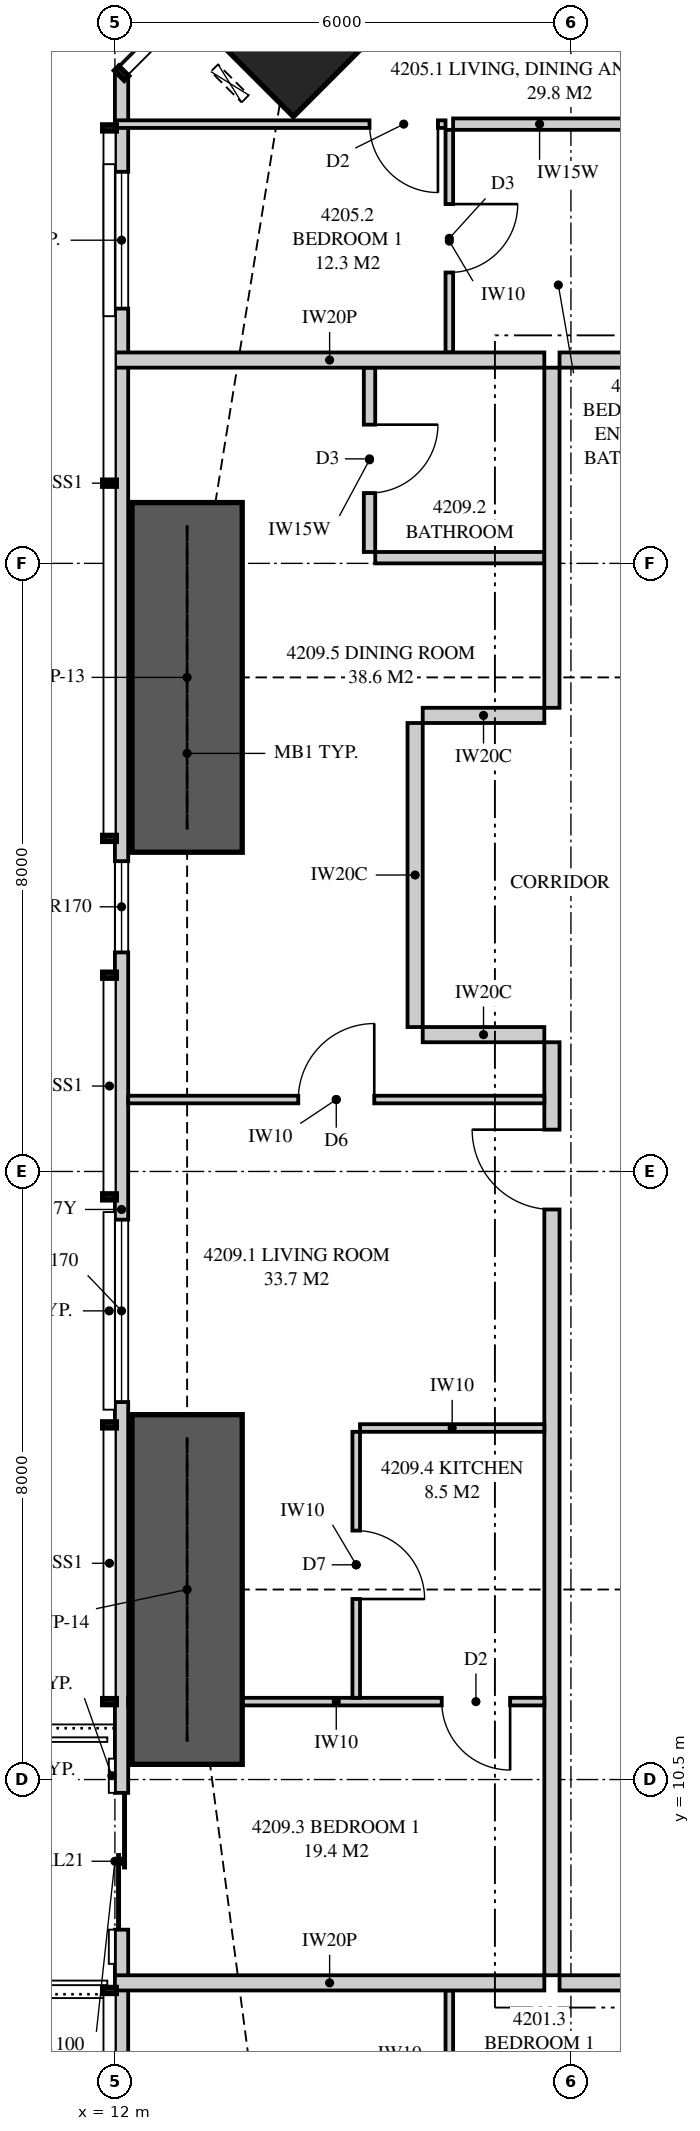
"""IFC4 building model, lengths in metres.
Left out: names, types, materials, properties, quantities, classifications, styles, units other than length and angle.
Written with IfcOpenShell. Run it as: python <this file> out.ifc"""

import sys

from ifc_helpers import new_model, si_unit, direction, frame, frame_2d, origin, origin_2d, place, context, subcontext, project, spatial, polyline, rectangle, hollow_rectangle, outline, extrude, element, fill, save


model = new_model("IFC4")
c1 = context("Model", 3, precision=1e-05, world=origin(), true_north=direction((0.0, 1.0)))
c2 = subcontext(c1, "Body", "Model", "MODEL_VIEW")
j1 = project(units=[si_unit("LENGTHUNIT", "METRE"), si_unit("PLANEANGLEUNIT", "RADIAN")], contexts=[c1])
p1 = place(None, origin())
s1 = spatial("IfcSite", under=j1, at=p1, CompositionType="ELEMENT")
p2 = place(p1, origin())
s2 = spatial("IfcBuilding", under=s1, at=p2, CompositionType="ELEMENT")
p3 = place(p2, frame((0.0, 0.0, 157.7)))
s3 = spatial("IfcBuildingStorey", under=s2, at=p3, CompositionType="ELEMENT", Elevation=157.7)
p4 = place(p3, frame((14.348, 33.652, 0.0), z_axis=(0.0, 0.0, 1.0), x_axis=(0.707106781187, -0.707106781187, 0.0)))
e1 = element("IfcColumn", 1, at=p4, inside=s3, PredefinedType="COLUMN", context=c2, shape_type="SweptSolid", body=[
    extrude(hollow_rectangle(XDim=1.8, YDim=1.8, WallThickness=0.125, at=origin_2d()), origin(), (0.0, 0.0, 1.0), 3.35),
])
p5 = place(p3, frame((12.087, 32.949, 0.0), z_axis=(0.0, 0.0, 1.0), x_axis=(0.0, -1.0, 0.0)))
e2 = element("IfcWall", 2, at=p5, inside=s3, PredefinedType="SOLIDWALL", context=c2, shape_type="SweptSolid", body=[
    extrude(outline(polyline([(0.0, 0.0), (29.897, 0.0), (29.897, 3.11), (20.191, 3.11), (20.191, 2.15), (20.051, 2.15), (20.051, 3.11), (19.949, 3.11), (19.949, 2.15), (7.949, 2.15), (7.949, 3.11), (7.823, 3.11), (7.823, 2.15), (7.73, 2.15), (7.73, 3.11), (0.0, 3.11), (0.0, 0.0)])), frame((0.0, 0.087, 0.0), z_axis=(0.0, -1.0, 0.0), x_axis=(1.0, 0.0, 0.0)), (0.0, 0.0, 1.0), 0.175),
])
p6 = place(p5, frame((1.297, 0.0, 0.4)))
e3 = element("IfcOpeningElement", 3, at=p6, cuts=e2, PredefinedType="OPENING", context=c2, shape_type="SweptSolid", body=[
    extrude(rectangle(XDim=1.8, YDim=1.7, at=frame_2d((0.9, 0.85))), frame((0.0, 0.097, 0.0), z_axis=(0.0, -1.0, 0.0), x_axis=(1.0, 0.0, 0.0)), (0.0, 0.0, 1.0), 0.195),
])
p7 = place(p5, frame((10.367, 0.0, 0.4)))
e4 = element("IfcOpeningElement", 4, at=p7, cuts=e2, PredefinedType="OPENING", context=c2, shape_type="SweptSolid", body=[
    extrude(rectangle(XDim=1.2, YDim=1.7, at=frame_2d((0.6, 0.85))), frame((0.0, 0.097, 0.0), z_axis=(0.0, -1.0, 0.0), x_axis=(1.0, 0.0, 0.0)), (0.0, 0.0, 1.0), 0.195),
])
p8 = place(p5, frame((15.083, 0.0, 0.4)))
e5 = element("IfcOpeningElement", 5, at=p8, cuts=e2, PredefinedType="OPENING", context=c2, shape_type="SweptSolid", body=[
    extrude(rectangle(XDim=2.4, YDim=1.7, at=frame_2d((1.2, 0.85))), frame((0.0, 0.097, 0.0), z_axis=(0.0, -1.0, 0.0), x_axis=(1.0, 0.0, 0.0)), (0.0, 0.0, 1.0), 0.195),
])
p9 = place(p5, frame((22.624, 0.0, 0.0)))
e6 = element("IfcOpeningElement", 6, at=p9, cuts=e2, PredefinedType="OPENING", context=c2, shape_type="SweptSolid", body=[
    extrude(rectangle(XDim=1.8, YDim=2.1, at=frame_2d((0.9, 1.05))), frame((0.0, 0.097, 0.0), z_axis=(0.0, -1.0, 0.0), x_axis=(1.0, 0.0, 0.0)), (0.0, 0.0, 1.0), 0.195),
])
p10 = place(p5, frame((26.301, 0.0, 0.4)))
e7 = element("IfcOpeningElement", 7, at=p10, cuts=e2, PredefinedType="OPENING", context=c2, shape_type="SweptSolid", body=[
    extrude(rectangle(XDim=1.8, YDim=1.7, at=frame_2d((0.9, 0.85))), frame((0.0, 0.097, 0.0), z_axis=(0.0, -1.0, 0.0), x_axis=(1.0, 0.0, 0.0)), (0.0, 0.0, 1.0), 0.195),
])
p11 = place(p3, frame((17.85, 7.825, 0.0), z_axis=(0.0, 0.0, 1.0), x_axis=(1.0, 0.0, 0.0)))
e8 = element("IfcWall", 8, at=p11, inside=s3, PredefinedType="PARTITIONING", context=c2, shape_type="SweptSolid", body=[
    extrude(rectangle(XDim=2.85, YDim=0.2, at=frame_2d((1.425, 0.0))), origin(), (0.0, 0.0, 1.0), 3.11),
])
p12 = place(p11, frame((1.2, 0.0, 0.0)))
e9 = element("IfcOpeningElement", 9, at=p12, cuts=e8, PredefinedType="OPENING", context=c2, shape_type="SweptSolid", body=[
    extrude(rectangle(XDim=1.05, YDim=2.2, at=frame_2d((0.525, 1.1))), frame((0.0, 0.11, 0.0), z_axis=(0.0, -1.0, 0.0), x_axis=(1.0, 0.0, 0.0)), (0.0, 0.0, 1.0), 0.22),
])
p13 = place(p3, frame((16.4, 3.796, 0.0), z_axis=(0.0, 0.0, 1.0), x_axis=(0.0, 1.0, 0.0)))
e10 = element("IfcWall", 10, at=p13, inside=s3, PredefinedType="PARTITIONING", context=c2, shape_type="SweptSolid", body=[
    extrude(rectangle(XDim=3.929, YDim=0.1, at=frame_2d((1.964, 0.0))), origin(), (0.0, 0.0, 1.0), 3.11),
])
p14 = place(p13, frame((1.477, 0.0, 0.0)))
e11 = element("IfcOpeningElement", 11, at=p14, cuts=e10, PredefinedType="OPENING", context=c2, shape_type="SweptSolid", body=[
    extrude(rectangle(XDim=0.9, YDim=2.1, at=frame_2d((0.45, 1.05))), frame((0.0, 0.06, 0.0), z_axis=(0.0, -1.0, 0.0), x_axis=(1.0, 0.0, 0.0)), (0.0, 0.0, 1.0), 0.12),
])
p15 = place(p3, frame((12.0, 7.825, 0.0), z_axis=(0.0, 0.0, 1.0), x_axis=(1.0, 0.0, 0.0)))
e12 = element("IfcWall", 12, at=p15, inside=s3, PredefinedType="PARTITIONING", context=c2, shape_type="SweptSolid", body=[
    extrude(outline(polyline([(0.0, 0.0), (5.65, 0.0), (5.65, 3.11), (2.547, 3.11), (2.547, 2.15), (0.712, 2.15), (0.712, 3.11), (0.0, 3.11), (0.0, 0.0)])), frame((0.0, 0.1, 0.0), z_axis=(0.0, -1.0, 0.0), x_axis=(1.0, 0.0, 0.0)), (0.0, 0.0, 1.0), 0.2),
])
p16 = place(p3, frame((17.85, 29.175, 0.0), z_axis=(0.0, 0.0, 1.0), x_axis=(1.0, 0.0, 0.0)))
e13 = element("IfcWall", 13, at=p16, inside=s3, PredefinedType="PARTITIONING", context=c2, shape_type="SweptSolid", body=[
    extrude(rectangle(XDim=2.65, YDim=0.2, at=frame_2d((1.325, 0.0))), origin(), (0.0, 0.0, 1.0), 3.11),
])
p17 = place(p16, frame((1.2, 0.0, 0.0)))
e14 = element("IfcOpeningElement", 14, at=p17, cuts=e13, PredefinedType="OPENING", context=c2, shape_type="SweptSolid", body=[
    extrude(rectangle(XDim=1.05, YDim=2.2, at=frame_2d((0.525, 1.1))), frame((0.0, 0.11, 0.0), z_axis=(0.0, -1.0, 0.0), x_axis=(1.0, 0.0, 0.0)), (0.0, 0.0, 1.0), 0.22),
])
p18 = place(p3, frame((16.4, 32.204, 0.0), z_axis=(0.0, 0.0, 1.0), x_axis=(0.0, -1.0, 0.0)))
e15 = element("IfcWall", 15, at=p18, inside=s3, PredefinedType="PARTITIONING", context=c2, shape_type="SweptSolid", body=[
    extrude(rectangle(XDim=2.929, YDim=0.1, at=frame_2d((1.464, 0.0))), origin(), (0.0, 0.0, 1.0), 3.11),
])
p19 = place(p18, frame((0.977, 0.0, 0.0)))
e16 = element("IfcOpeningElement", 16, at=p19, cuts=e15, PredefinedType="OPENING", context=c2, shape_type="SweptSolid", body=[
    extrude(rectangle(XDim=0.9, YDim=2.1, at=frame_2d((0.45, 1.05))), frame((0.0, 0.06, 0.0), z_axis=(0.0, -1.0, 0.0), x_axis=(1.0, 0.0, 0.0)), (0.0, 0.0, 1.0), 0.12),
])
p20 = place(p3, frame((16.35, 32.279, 0.0), z_axis=(0.0, 0.0, 1.0), x_axis=(-1.0, 0.0, 0.0)))
e17 = element("IfcWall", 17, at=p20, inside=s3, PredefinedType="PARTITIONING", context=c2, shape_type="SweptSolid", body=[
    extrude(outline(polyline([(0.0, 0.0), (4.35, 0.0), (4.35, 3.11), (3.094, 3.11), (3.094, 2.15), (1.352, 2.15), (1.352, 3.11), (0.0, 3.11), (0.0, 0.0)])), frame((0.0, 0.05, 0.0), z_axis=(0.0, -1.0, 0.0), x_axis=(1.0, 0.0, 0.0)), (0.0, 0.0, 1.0), 0.1),
])
p21 = place(p20, frame((0.1, 0.0, 0.0)))
e18 = element("IfcOpeningElement", 18, at=p21, cuts=e17, PredefinedType="OPENING", context=c2, shape_type="SweptSolid", body=[
    extrude(rectangle(XDim=0.9, YDim=2.1, at=frame_2d((0.45, 1.05))), frame((0.0, 0.06, 0.0), z_axis=(0.0, -1.0, 0.0), x_axis=(1.0, 0.0, 0.0)), (0.0, 0.0, 1.0), 0.12),
])
p22 = place(p3, frame((18.725, 32.279, 0.0), z_axis=(0.0, 0.0, 1.0), x_axis=(-1.0, 0.0, 0.0)))
e19 = element("IfcWall", 19, at=p22, inside=s3, PredefinedType="PLUMBINGWALL", context=c2, shape_type="SweptSolid", body=[
    extrude(rectangle(XDim=2.275, YDim=0.15, at=frame_2d((1.138, 0.0))), origin(), (0.0, 0.0, 1.0), 3.11),
])
p23 = place(p3, frame((12.0, 29.175, 0.0), z_axis=(0.0, 0.0, 1.0), x_axis=(1.0, 0.0, 0.0)))
e20 = element("IfcWall", 20, at=p23, inside=s3, PredefinedType="PARTITIONING", context=c2, shape_type="SweptSolid", body=[
    extrude(outline(polyline([(0.0, 0.0), (5.65, 0.0), (5.65, 3.11), (2.547, 3.11), (2.547, 2.15), (0.703, 2.15), (0.703, 3.11), (0.0, 3.11), (0.0, 0.0)])), frame((0.0, 0.1, 0.0), z_axis=(0.0, -1.0, 0.0), x_axis=(1.0, 0.0, 0.0)), (0.0, 0.0, 1.0), 0.2),
])
p24 = place(p3, frame((17.75, 7.925, 0.0), z_axis=(0.0, 0.0, 1.0), x_axis=(0.0, 1.0, 0.0)))
e21 = element("IfcWall", 21, at=p24, inside=s3, PredefinedType="PARTITIONING", context=c2, shape_type="SweptSolid", body=[
    extrude(outline(polyline([(0.0, 0.0), (12.275, 0.0), (12.275, 3.11), (5.421, 3.11), (5.421, 2.531), (4.729, 2.531), (4.729, 3.11), (0.0, 3.11), (0.0, 0.0)])), frame((0.0, 0.1, 0.0), z_axis=(0.0, -1.0, 0.0), x_axis=(1.0, 0.0, 0.0)), (0.0, 0.0, 1.0), 0.2),
])
p25 = place(p24, frame((10.075, 0.0, 0.0)))
e22 = element("IfcOpeningElement", 22, at=p25, cuts=e21, PredefinedType="OPENING", context=c2, shape_type="SweptSolid", body=[
    extrude(rectangle(XDim=1.05, YDim=2.2, at=frame_2d((0.525, 1.1))), frame((0.0, 0.11, 0.0), z_axis=(0.0, -1.0, 0.0), x_axis=(1.0, 0.0, 0.0)), (0.0, 0.0, 1.0), 0.22),
])
p26 = place(p3, frame((15.35, 26.65, 0.0), z_axis=(0.0, 0.0, 1.0), x_axis=(0.0, 1.0, 0.0)))
e23 = element("IfcWall", 23, at=p26, inside=s3, PredefinedType="PLUMBINGWALL", context=c2, shape_type="SweptSolid", body=[
    extrude(rectangle(XDim=2.425, YDim=0.15, at=frame_2d((1.212, 0.0))), origin(), (0.0, 0.0, 1.0), 3.11),
])
p27 = place(p26, frame((0.775, 0.0, 0.0)))
e24 = element("IfcOpeningElement", 24, at=p27, cuts=e23, PredefinedType="OPENING", context=c2, shape_type="SweptSolid", body=[
    extrude(rectangle(XDim=0.9, YDim=2.1, at=frame_2d((0.45, 1.05))), frame((0.0, 0.085, 0.0), z_axis=(0.0, -1.0, 0.0), x_axis=(1.0, 0.0, 0.0)), (0.0, 0.0, 1.0), 0.17),
])
p28 = place(p3, frame((15.425, 26.575, 0.0), z_axis=(0.0, 0.0, 1.0), x_axis=(1.0, 0.0, 0.0)))
e25 = element("IfcWall", 25, at=p28, inside=s3, PredefinedType="PLUMBINGWALL", context=c2, shape_type="SweptSolid", body=[
    extrude(rectangle(XDim=2.225, YDim=0.15, at=frame_2d((1.112, 0.0))), origin(), (0.0, 0.0, 1.0), 3.11),
])
p29 = place(p3, frame((12.175, 11.525, 0.0), z_axis=(0.0, 0.0, 1.0), x_axis=(1.0, 0.0, 0.0)))
e26 = element("IfcWall", 26, at=p29, inside=s3, PredefinedType="PARTITIONING", context=c2, shape_type="SweptSolid", body=[
    extrude(outline(polyline([(0.101, 3.11), (0.0, 3.11), (0.0, 0.0), (0.529, 0.0), (0.529, 0.269), (1.021, 0.269), (1.021, 0.0), (5.475, 0.0), (5.475, 3.11), (1.836, 3.11), (1.836, 2.15), (1.021, 2.15), (1.021, 1.881), (0.529, 1.881), (0.529, 2.15), (0.101, 2.15), (0.101, 3.11)])), frame((0.0, 0.05, 0.0), z_axis=(0.0, -1.0, 0.0), x_axis=(1.0, 0.0, 0.0)), (0.0, 0.0, 1.0), 0.1),
])
p30 = place(p29, frame((4.125, 0.0, 0.0)))
e27 = element("IfcOpeningElement", 27, at=p30, cuts=e26, PredefinedType="OPENING", context=c2, shape_type="SweptSolid", body=[
    extrude(rectangle(XDim=0.9, YDim=2.1, at=frame_2d((0.45, 1.05))), frame((0.0, 0.06, 0.0), z_axis=(0.0, -1.0, 0.0), x_axis=(1.0, 0.0, 0.0)), (0.0, 0.0, 1.0), 0.12),
])
p31 = place(p3, frame((15.175, 11.575, 0.0), z_axis=(0.0, 0.0, 1.0), x_axis=(0.0, 1.0, 0.0)))
e28 = element("IfcWall", 28, at=p31, inside=s3, PredefinedType="PARTITIONING", context=c2, shape_type="SweptSolid", body=[
    extrude(outline(polyline([(0.0, 0.0), (3.5, 0.0), (3.5, 3.11), (1.721, 3.11), (1.721, 2.531), (1.129, 2.531), (1.129, 3.11), (0.0, 3.11), (0.0, 0.0)])), frame((0.0, 0.05, 0.0), z_axis=(0.0, -1.0, 0.0), x_axis=(1.0, 0.0, 0.0)), (0.0, 0.0, 1.0), 0.1),
])
p32 = place(p31, frame((1.3, 0.0, 0.0)))
e29 = element("IfcOpeningElement", 29, at=p32, cuts=e28, PredefinedType="OPENING", context=c2, shape_type="SweptSolid", body=[
    extrude(rectangle(XDim=0.9, YDim=2.1, at=frame_2d((0.45, 1.05))), frame((0.0, 0.06, 0.0), z_axis=(0.0, -1.0, 0.0), x_axis=(1.0, 0.0, 0.0)), (0.0, 0.0, 1.0), 0.12),
])
p33 = place(p3, frame((15.225, 15.125, 0.0), z_axis=(0.0, 0.0, 1.0), x_axis=(1.0, 0.0, 0.0)))
e30 = element("IfcWall", 30, at=p33, inside=s3, PredefinedType="PARTITIONING", context=c2, shape_type="SweptSolid", body=[
    extrude(rectangle(XDim=2.425, YDim=0.1, at=frame_2d((1.212, 0.0))), origin(), (0.0, 0.0, 1.0), 3.11),
])
p34 = place(p3, frame((12.175, 19.446, 0.0), z_axis=(0.0, 0.0, 1.0), x_axis=(1.0, 0.0, 0.0)))
e31 = element("IfcWall", 31, at=p34, inside=s3, PredefinedType="PARTITIONING", context=c2, shape_type="SweptSolid", body=[
    extrude(outline(polyline([(0.0, 0.0), (5.475, 0.0), (5.475, 3.11), (1.635, 3.11), (1.635, 2.15), (0.0, 2.15), (0.0, 3.11), (0.0, 0.0)])), frame((0.0, 0.05, 0.0), z_axis=(0.0, -1.0, 0.0), x_axis=(1.0, 0.0, 0.0)), (0.0, 0.0, 1.0), 0.1),
])
p35 = place(p34, frame((2.238, 0.0, 0.0)))
e32 = element("IfcOpeningElement", 32, at=p35, cuts=e31, PredefinedType="OPENING", context=c2, shape_type="SweptSolid", body=[
    extrude(rectangle(XDim=1.0, YDim=2.1, at=frame_2d((0.5, 1.05))), frame((0.0, 0.06, 0.0), z_axis=(0.0, -1.0, 0.0), x_axis=(1.0, 0.0, 0.0)), (0.0, 0.0, 1.0), 0.12),
])
p36 = place(p3, frame((17.75, 24.6, 0.0), z_axis=(0.0, 0.0, 1.0), x_axis=(0.0, 1.0, 0.0)))
e33 = element("IfcWall", 33, at=p36, inside=s3, PredefinedType="PARTITIONING", context=c2, shape_type="SweptSolid", body=[
    extrude(outline(polyline([(0.0, 0.0), (4.475, 0.0), (4.475, 3.11), (0.746, 3.11), (0.746, 2.531), (0.054, 2.531), (0.054, 3.11), (0.0, 3.11), (0.0, 0.0)])), frame((0.0, 0.1, 0.0), z_axis=(0.0, -1.0, 0.0), x_axis=(1.0, 0.0, 0.0)), (0.0, 0.0, 1.0), 0.2),
])
p37 = place(p3, frame((15.95, 20.4, 0.0), z_axis=(0.0, 0.0, 1.0), x_axis=(0.0, 1.0, 0.0)))
e34 = element("IfcWall", 34, at=p37, inside=s3, PredefinedType="PARTITIONING", context=c2, shape_type="SweptSolid", body=[
    extrude(rectangle(XDim=4.0, YDim=0.2, at=frame_2d((2.0, 0.0))), origin(), (0.0, 0.0, 1.0), 3.11),
])
for number, where, z_axis, x_axis in (
    (35, (17.65, 20.3, 0.0), (0.0, 0.0, 1.0), (-1.0, 0.0, 0.0)),
    (36, (17.65, 24.5, 0.0), (0.0, 0.0, 1.0), (-1.0, 0.0, 0.0)),
):
    element("IfcWall", number, at=place(p3, frame(where, z_axis=z_axis, x_axis=x_axis)), inside=s3, PredefinedType="PARTITIONING", context=c2, shape_type="SweptSolid", body=[
        extrude(rectangle(XDim=1.6, YDim=0.2, at=frame_2d((0.8, 0.0))), origin(), (0.0, 0.0, 1.0), 3.11),
    ])
for number, where, z_axis, x_axis in (
    (37, (12.95, 22.7, 0.0), (0.0, 0.0, 1.0), (0.0, 1.0, 0.0)),
    (38, (12.95, 10.7, 0.0), (0.0, 0.0, 1.0), (0.0, 1.0, 0.0)),
):
    element("IfcWall", number, at=place(p3, frame(where, z_axis=z_axis, x_axis=x_axis)), inside=s3, PredefinedType="SHEAR", context=c2, shape_type="SweptSolid", body=[
        extrude(rectangle(XDim=4.6, YDim=1.45, at=frame_2d((2.3, 0.0))), origin(), (0.0, 0.0, 1.0), 3.35),
    ])
p38 = place(p6, origin())
e39 = element("IfcWindow", 39, at=p38, inside=s3, PartitioningType="SINGLE_PANEL", PredefinedType="WINDOW", context=c2, shape_type="SweptSolid", body=[
    extrude(rectangle(XDim=1.8, YDim=1.7, at=frame_2d((0.9, 0.85))), frame((0.0, 0.03, 0.0), z_axis=(0.0, -1.0, 0.0), x_axis=(1.0, 0.0, 0.0)), (0.0, 0.0, 1.0), 0.06),
])
fill(e3, e39)
p39 = place(p7, origin())
e40 = element("IfcWindow", 40, at=p39, inside=s3, PartitioningType="SINGLE_PANEL", PredefinedType="WINDOW", context=c2, shape_type="SweptSolid", body=[
    extrude(rectangle(XDim=1.2, YDim=1.7, at=frame_2d((0.6, 0.85))), frame((0.0, 0.03, 0.0), z_axis=(0.0, -1.0, 0.0), x_axis=(1.0, 0.0, 0.0)), (0.0, 0.0, 1.0), 0.06),
])
fill(e4, e40)
p40 = place(p8, origin())
e41 = element("IfcWindow", 41, at=p40, inside=s3, PartitioningType="SINGLE_PANEL", PredefinedType="WINDOW", context=c2, shape_type="SweptSolid", body=[
    extrude(rectangle(XDim=2.4, YDim=1.7, at=frame_2d((1.2, 0.85))), frame((0.0, 0.03, 0.0), z_axis=(0.0, -1.0, 0.0), x_axis=(1.0, 0.0, 0.0)), (0.0, 0.0, 1.0), 0.06),
])
fill(e5, e41)
p41 = place(p9, origin())
e42 = element("IfcDoor", 42, at=p41, inside=s3, OperationType="SLIDING_TO_LEFT", PredefinedType="DOOR", context=c2, shape_type="SweptSolid", body=[
    extrude(rectangle(XDim=1.8, YDim=2.1, at=frame_2d((0.9, 1.05))), frame((0.0, 0.025, 0.0), z_axis=(0.0, -1.0, 0.0), x_axis=(1.0, 0.0, 0.0)), (0.0, 0.0, 1.0), 0.05),
])
fill(e6, e42)
p42 = place(p21, origin())
e43 = element("IfcDoor", 43, at=p42, inside=s3, OperationType="SINGLE_SWING_LEFT", PredefinedType="DOOR", context=c2, shape_type="SweptSolid", body=[
    extrude(rectangle(XDim=0.9, YDim=2.1, at=frame_2d((0.45, 1.05))), frame((0.0, 0.025, 0.0), z_axis=(0.0, -1.0, 0.0), x_axis=(1.0, 0.0, 0.0)), (0.0, 0.0, 1.0), 0.05),
])
fill(e18, e43)
p43 = place(p19, origin())
e44 = element("IfcDoor", 44, at=p43, inside=s3, OperationType="SINGLE_SWING_LEFT", PredefinedType="DOOR", context=c2, shape_type="SweptSolid", body=[
    extrude(rectangle(XDim=0.9, YDim=2.1, at=frame_2d((0.45, 1.05))), frame((0.0, 0.025, 0.0), z_axis=(0.0, -1.0, 0.0), x_axis=(1.0, 0.0, 0.0)), (0.0, 0.0, 1.0), 0.05),
])
fill(e16, e44)
p44 = place(p25, origin())
e45 = element("IfcDoor", 45, at=p44, inside=s3, OperationType="SINGLE_SWING_RIGHT", PredefinedType="DOOR", context=c2, shape_type="SweptSolid", body=[
    extrude(rectangle(XDim=1.05, YDim=2.2, at=frame_2d((0.525, 1.1))), frame((0.0, 0.025, 0.0), z_axis=(0.0, -1.0, 0.0), x_axis=(1.0, 0.0, 0.0)), (0.0, 0.0, 1.0), 0.05),
])
fill(e22, e45)
p45 = place(p27, frame((0.9, 0.0, 0.0), z_axis=(0.0, 0.0, 1.0), x_axis=(-1.0, 0.0, 0.0)))
e46 = element("IfcDoor", 46, at=p45, inside=s3, OperationType="SINGLE_SWING_LEFT", PredefinedType="DOOR", context=c2, shape_type="SweptSolid", body=[
    extrude(rectangle(XDim=0.9, YDim=2.1, at=frame_2d((0.45, 1.05))), frame((0.0, 0.025, 0.0), z_axis=(0.0, -1.0, 0.0), x_axis=(1.0, 0.0, 0.0)), (0.0, 0.0, 1.0), 0.05),
])
fill(e24, e46)
p46 = place(p30, frame((0.9, 0.0, 0.0), z_axis=(0.0, 0.0, 1.0), x_axis=(-1.0, 0.0, 0.0)))
e47 = element("IfcDoor", 47, at=p46, inside=s3, OperationType="SINGLE_SWING_LEFT", PredefinedType="DOOR", context=c2, shape_type="SweptSolid", body=[
    extrude(rectangle(XDim=0.9, YDim=2.1, at=frame_2d((0.45, 1.05))), frame((0.0, 0.025, 0.0), z_axis=(0.0, -1.0, 0.0), x_axis=(1.0, 0.0, 0.0)), (0.0, 0.0, 1.0), 0.05),
])
fill(e27, e47)
p47 = place(p32, frame((0.9, 0.0, 0.0), z_axis=(0.0, 0.0, 1.0), x_axis=(-1.0, 0.0, 0.0)))
e48 = element("IfcDoor", 48, at=p47, inside=s3, OperationType="SINGLE_SWING_RIGHT", PredefinedType="DOOR", context=c2, shape_type="SweptSolid", body=[
    extrude(rectangle(XDim=0.9, YDim=2.1, at=frame_2d((0.45, 1.05))), frame((0.0, 0.025, 0.0), z_axis=(0.0, -1.0, 0.0), x_axis=(1.0, 0.0, 0.0)), (0.0, 0.0, 1.0), 0.05),
])
fill(e29, e48)
p48 = place(p35, origin())
e49 = element("IfcDoor", 49, at=p48, inside=s3, OperationType="SINGLE_SWING_RIGHT", PredefinedType="DOOR", context=c2, shape_type="SweptSolid", body=[
    extrude(rectangle(XDim=1.0, YDim=2.1, at=frame_2d((0.5, 1.05))), frame((0.0, 0.025, 0.0), z_axis=(0.0, -1.0, 0.0), x_axis=(1.0, 0.0, 0.0)), (0.0, 0.0, 1.0), 0.05),
])
fill(e32, e49)
save(model, sys.argv[1])
